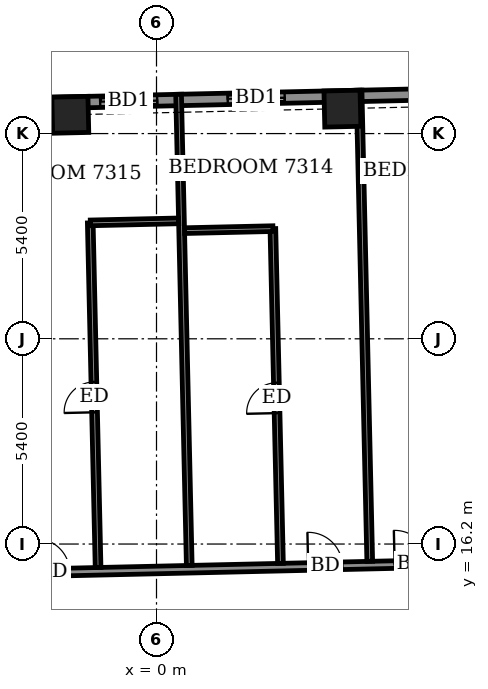
"""IFC4 building model, lengths in metres.
Left out: names, types, materials, properties, quantities, classifications, styles, units other than length and angle.
Written with IfcOpenShell. Run it as: python <this file> out.ifc"""

import sys

from ifc_helpers import new_model, si_unit, direction, frame, frame_2d, origin, origin_2d, place, context, subcontext, project, spatial, rectangle, extrude, element, fill, save


model = new_model("IFC4")
c1 = context("Model", 3, precision=1e-05, world=origin(), true_north=direction((0.0, 1.0)))
c2 = subcontext(c1, "Body", "Model", "MODEL_VIEW")
j1 = project(units=[si_unit("LENGTHUNIT", "METRE"), si_unit("PLANEANGLEUNIT", "RADIAN")], contexts=[c1])
p1 = place(None, origin())
s1 = spatial("IfcSite", under=j1, at=p1, CompositionType="ELEMENT")
p2 = place(p1, origin())
s2 = spatial("IfcBuilding", under=s1, at=p2, CompositionType="ELEMENT")
p3 = place(p2, frame((0.0, 0.0, 287.1)))
s3 = spatial("IfcBuildingStorey", under=s2, at=p3, CompositionType="ELEMENT", Elevation=287.1)
for number, where, z_axis, x_axis in (
    (1, (4.892, 27.656, -0.55), (0.0, 0.0, 1.0), (-1.0, -0.023, 0.0)),
    (2, (-2.268, 27.494, -0.55), (0.0, 0.0, 1.0), (-1.0, -0.023, 0.0)),
):
    element("IfcColumn", number, at=place(p3, frame(where, z_axis=z_axis, x_axis=x_axis)), inside=s3, PredefinedType="COLUMN", context=c2, shape_type="SweptSolid", body=[
        extrude(rectangle(XDim=0.95, YDim=0.95, at=origin_2d()), origin(), (0.0, 0.0, 1.0), 3.6),
    ])
p4 = place(p3, frame((26.216, 28.465, 0.0), z_axis=(0.0, 0.0, 1.0), x_axis=(-0.999742843677, -0.022677004157, 0.0)))
e3 = element("IfcWall", 3, at=p4, inside=s3, PredefinedType="SOLIDWALL", context=c2, shape_type="SweptSolid", body=[
    extrude(rectangle(XDim=49.836, YDim=0.3, at=frame_2d((24.918, 0.0))), origin(), (0.0, 0.0, 1.0), 2.5),
])
p5 = place(p4, frame((0.938, 0.0, 0.0)))
e4 = element("IfcOpeningElement", 4, at=p5, cuts=e3, PredefinedType="OPENING", context=c2, shape_type="SweptSolid", body=[
    extrude(rectangle(XDim=1.5, YDim=2.4, at=frame_2d((0.75, 1.2))), frame((0.0, 0.16, 0.0), z_axis=(0.0, -1.0, 0.0), x_axis=(1.0, 0.0, 0.0)), (0.0, 0.0, 1.0), 0.32),
])
p6 = place(p4, frame((4.087, 0.0, 0.0)))
e5 = element("IfcOpeningElement", 5, at=p6, cuts=e3, PredefinedType="OPENING", context=c2, shape_type="SweptSolid", body=[
    extrude(rectangle(XDim=1.5, YDim=2.4, at=frame_2d((0.75, 1.2))), frame((0.0, 0.16, 0.0), z_axis=(0.0, -1.0, 0.0), x_axis=(1.0, 0.0, 0.0)), (0.0, 0.0, 1.0), 0.32),
])
p7 = place(p4, frame((8.711, 0.0, 0.0)))
e6 = element("IfcOpeningElement", 6, at=p7, cuts=e3, PredefinedType="OPENING", context=c2, shape_type="SweptSolid", body=[
    extrude(rectangle(XDim=1.5, YDim=2.4, at=frame_2d((0.75, 1.2))), frame((0.0, 0.16, 0.0), z_axis=(0.0, -1.0, 0.0), x_axis=(1.0, 0.0, 0.0)), (0.0, 0.0, 1.0), 0.32),
])
p8 = place(p4, frame((12.067, 0.0, 0.0)))
e7 = element("IfcOpeningElement", 7, at=p8, cuts=e3, PredefinedType="OPENING", context=c2, shape_type="SweptSolid", body=[
    extrude(rectangle(XDim=1.5, YDim=2.4, at=frame_2d((0.75, 1.2))), frame((0.0, 0.16, 0.0), z_axis=(0.0, -1.0, 0.0), x_axis=(1.0, 0.0, 0.0)), (0.0, 0.0, 1.0), 0.32),
])
p9 = place(p4, frame((17.836, 0.0, 0.0)))
e8 = element("IfcOpeningElement", 8, at=p9, cuts=e3, PredefinedType="OPENING", context=c2, shape_type="SweptSolid", body=[
    extrude(rectangle(XDim=1.5, YDim=2.4, at=frame_2d((0.75, 1.2))), frame((0.0, 0.16, 0.0), z_axis=(0.0, -1.0, 0.0), x_axis=(1.0, 0.0, 0.0)), (0.0, 0.0, 1.0), 0.32),
])
p10 = place(p4, frame((22.849, 0.0, 0.0)))
e9 = element("IfcOpeningElement", 9, at=p10, cuts=e3, PredefinedType="OPENING", context=c2, shape_type="SweptSolid", body=[
    extrude(rectangle(XDim=1.5, YDim=2.4, at=frame_2d((0.75, 1.2))), frame((0.0, 0.16, 0.0), z_axis=(0.0, -1.0, 0.0), x_axis=(1.0, 0.0, 0.0)), (0.0, 0.0, 1.0), 0.32),
])
p11 = place(p4, frame((26.205, 0.0, 0.0)))
e10 = element("IfcOpeningElement", 10, at=p11, cuts=e3, PredefinedType="OPENING", context=c2, shape_type="SweptSolid", body=[
    extrude(rectangle(XDim=1.5, YDim=2.4, at=frame_2d((0.75, 1.2))), frame((0.0, 0.16, 0.0), z_axis=(0.0, -1.0, 0.0), x_axis=(1.0, 0.0, 0.0)), (0.0, 0.0, 1.0), 0.32),
])
p12 = place(p4, frame((32.011, 0.0, 0.0)))
e11 = element("IfcOpeningElement", 11, at=p12, cuts=e3, PredefinedType="OPENING", context=c2, shape_type="SweptSolid", body=[
    extrude(rectangle(XDim=1.5, YDim=2.4, at=frame_2d((0.75, 1.2))), frame((0.0, 0.16, 0.0), z_axis=(0.0, -1.0, 0.0), x_axis=(1.0, 0.0, 0.0)), (0.0, 0.0, 1.0), 0.32),
])
p13 = place(p4, frame((37.011, 0.0, 0.0)))
e12 = element("IfcOpeningElement", 12, at=p13, cuts=e3, PredefinedType="OPENING", context=c2, shape_type="SweptSolid", body=[
    extrude(rectangle(XDim=1.5, YDim=2.4, at=frame_2d((0.75, 1.2))), frame((0.0, 0.16, 0.0), z_axis=(0.0, -1.0, 0.0), x_axis=(1.0, 0.0, 0.0)), (0.0, 0.0, 1.0), 0.32),
])
p14 = place(p4, frame((40.367, 0.0, 0.0)))
e13 = element("IfcOpeningElement", 13, at=p14, cuts=e3, PredefinedType="OPENING", context=c2, shape_type="SweptSolid", body=[
    extrude(rectangle(XDim=1.5, YDim=2.4, at=frame_2d((0.75, 1.2))), frame((0.0, 0.16, 0.0), z_axis=(0.0, -1.0, 0.0), x_axis=(1.0, 0.0, 0.0)), (0.0, 0.0, 1.0), 0.32),
])
p15 = place(p4, frame((45.499, 0.0, 0.9)))
e14 = element("IfcOpeningElement", 14, at=p15, cuts=e3, PredefinedType="OPENING", context=c2, shape_type="SweptSolid", body=[
    extrude(rectangle(XDim=2.4, YDim=1.5, at=frame_2d((1.2, 0.75))), frame((0.0, 0.16, 0.0), z_axis=(0.0, -1.0, 0.0), x_axis=(1.0, 0.0, 0.0)), (0.0, 0.0, 1.0), 0.32),
])
p16 = place(p3, frame((-26.401, 14.918, 0.0), z_axis=(0.0, 0.0, 1.0), x_axis=(0.99974239733, 0.022696673341, 0.0)))
e15 = element("IfcWall", 15, at=p16, inside=s3, PredefinedType="PARTITIONING", context=c2, shape_type="SweptSolid", body=[
    extrude(rectangle(XDim=55.386, YDim=0.2, at=frame_2d((27.693, 0.0))), origin(), (0.0, 0.0, 1.0), 3.05),
])
p17 = place(p16, frame((52.889, 0.0, 0.0)))
e16 = element("IfcOpeningElement", 16, at=p17, cuts=e15, PredefinedType="OPENING", context=c2, shape_type="SweptSolid", body=[
    extrude(rectangle(XDim=1.0, YDim=2.1, at=frame_2d((0.5, 1.05))), frame((0.0, 0.11, 0.0), z_axis=(0.0, -1.0, 0.0), x_axis=(1.0, 0.0, 0.0)), (0.0, 0.0, 1.0), 0.22),
])
p18 = place(p16, frame((48.6, 0.0, 0.0)))
e17 = element("IfcOpeningElement", 17, at=p18, cuts=e15, PredefinedType="OPENING", context=c2, shape_type="SweptSolid", body=[
    extrude(rectangle(XDim=0.9, YDim=2.1, at=frame_2d((0.45, 1.05))), frame((0.0, 0.11, 0.0), z_axis=(0.0, -1.0, 0.0), x_axis=(1.0, 0.0, 0.0)), (0.0, 0.0, 1.0), 0.22),
])
p19 = place(p16, frame((41.8, 0.0, 0.0)))
e18 = element("IfcOpeningElement", 18, at=p19, cuts=e15, PredefinedType="OPENING", context=c2, shape_type="SweptSolid", body=[
    extrude(rectangle(XDim=0.9, YDim=2.1, at=frame_2d((0.45, 1.05))), frame((0.0, 0.11, 0.0), z_axis=(0.0, -1.0, 0.0), x_axis=(1.0, 0.0, 0.0)), (0.0, 0.0, 1.0), 0.22),
])
p20 = place(p16, frame((39.675, 0.0, 0.0)))
e19 = element("IfcOpeningElement", 19, at=p20, cuts=e15, PredefinedType="OPENING", context=c2, shape_type="SweptSolid", body=[
    extrude(rectangle(XDim=0.9, YDim=2.1, at=frame_2d((0.45, 1.05))), frame((0.0, 0.11, 0.0), z_axis=(0.0, -1.0, 0.0), x_axis=(1.0, 0.0, 0.0)), (0.0, 0.0, 1.0), 0.22),
])
p21 = place(p16, frame((32.675, 0.0, 0.0)))
e20 = element("IfcOpeningElement", 20, at=p21, cuts=e15, PredefinedType="OPENING", context=c2, shape_type="SweptSolid", body=[
    extrude(rectangle(XDim=0.9, YDim=2.1, at=frame_2d((0.45, 1.05))), frame((0.0, 0.11, 0.0), z_axis=(0.0, -1.0, 0.0), x_axis=(1.0, 0.0, 0.0)), (0.0, 0.0, 1.0), 0.22),
])
p22 = place(p16, frame((30.4, 0.0, 0.0)))
e21 = element("IfcOpeningElement", 21, at=p22, cuts=e15, PredefinedType="OPENING", context=c2, shape_type="SweptSolid", body=[
    extrude(rectangle(XDim=0.9, YDim=2.1, at=frame_2d((0.45, 1.05))), frame((0.0, 0.11, 0.0), z_axis=(0.0, -1.0, 0.0), x_axis=(1.0, 0.0, 0.0)), (0.0, 0.0, 1.0), 0.22),
])
p23 = place(p16, frame((23.225, 0.0, 0.0)))
e22 = element("IfcOpeningElement", 22, at=p23, cuts=e15, PredefinedType="OPENING", context=c2, shape_type="SweptSolid", body=[
    extrude(rectangle(XDim=0.9, YDim=2.1, at=frame_2d((0.45, 1.05))), frame((0.0, 0.11, 0.0), z_axis=(0.0, -1.0, 0.0), x_axis=(1.0, 0.0, 0.0)), (0.0, 0.0, 1.0), 0.22),
])
p24 = place(p16, frame((20.9, 0.0, 0.0)))
e23 = element("IfcOpeningElement", 23, at=p24, cuts=e15, PredefinedType="OPENING", context=c2, shape_type="SweptSolid", body=[
    extrude(rectangle(XDim=0.9, YDim=2.1, at=frame_2d((0.45, 1.05))), frame((0.0, 0.11, 0.0), z_axis=(0.0, -1.0, 0.0), x_axis=(1.0, 0.0, 0.0)), (0.0, 0.0, 1.0), 0.22),
])
p25 = place(p16, frame((13.9, 0.0, 0.0)))
e24 = element("IfcOpeningElement", 24, at=p25, cuts=e15, PredefinedType="OPENING", context=c2, shape_type="SweptSolid", body=[
    extrude(rectangle(XDim=0.9, YDim=2.1, at=frame_2d((0.45, 1.05))), frame((0.0, 0.11, 0.0), z_axis=(0.0, -1.0, 0.0), x_axis=(1.0, 0.0, 0.0)), (0.0, 0.0, 1.0), 0.22),
])
p26 = place(p16, frame((11.775, 0.0, 0.0)))
e25 = element("IfcOpeningElement", 25, at=p26, cuts=e15, PredefinedType="OPENING", context=c2, shape_type="SweptSolid", body=[
    extrude(rectangle(XDim=0.9, YDim=2.1, at=frame_2d((0.45, 1.05))), frame((0.0, 0.11, 0.0), z_axis=(0.0, -1.0, 0.0), x_axis=(1.0, 0.0, 0.0)), (0.0, 0.0, 1.0), 0.22),
])
p27 = place(p16, frame((1.65, 0.0, 0.0)))
e26 = element("IfcOpeningElement", 26, at=p27, cuts=e15, PredefinedType="OPENING", context=c2, shape_type="SweptSolid", body=[
    extrude(rectangle(XDim=1.0, YDim=2.1, at=frame_2d((0.5, 1.05))), frame((0.0, 0.11, 0.0), z_axis=(0.0, -1.0, 0.0), x_axis=(1.0, 0.0, 0.0)), (0.0, 0.0, 1.0), 0.22),
])
p28 = place(p16, frame((7.025, 0.0, 0.0)))
e27 = element("IfcOpeningElement", 27, at=p28, cuts=e15, PredefinedType="OPENING", context=c2, shape_type="SweptSolid", body=[
    extrude(rectangle(XDim=0.9, YDim=2.1, at=frame_2d((0.45, 1.05))), frame((0.0, 0.11, 0.0), z_axis=(0.0, -1.0, 0.0), x_axis=(1.0, 0.0, 0.0)), (0.0, 0.0, 1.0), 0.22),
])
p29 = place(p3, frame((-1.537, 15.582, 0.0), z_axis=(0.0, 0.0, 1.0), x_axis=(-0.022690833899, 0.999742529883, 0.0)))
e28 = element("IfcWall", 28, at=p29, inside=s3, PredefinedType="PARTITIONING", context=c2, shape_type="SweptSolid", body=[
    extrude(rectangle(XDim=9.07, YDim=0.15, at=frame_2d((4.535, 0.0))), origin(), (0.0, 0.0, 1.0), 3.05),
])
p30 = place(p29, frame((4.085, 0.0, 0.0)))
e29 = element("IfcOpeningElement", 29, at=p30, cuts=e28, PredefinedType="OPENING", context=c2, shape_type="SweptSolid", body=[
    extrude(rectangle(XDim=0.8, YDim=2.1, at=frame_2d((0.4, 1.05))), frame((0.0, 0.085, 0.0), z_axis=(0.0, -1.0, 0.0), x_axis=(1.0, 0.0, 0.0)), (0.0, 0.0, 1.0), 0.17),
])
p31 = place(p3, frame((0.862, 15.637, 0.0), z_axis=(0.0, 0.0, 1.0), x_axis=(-0.022661475803, 0.999743195783, 0.0)))
e30 = element("IfcWall", 30, at=p31, inside=s3, PredefinedType="PARTITIONING", context=c2, shape_type="SweptSolid", body=[
    extrude(rectangle(XDim=12.4, YDim=0.15, at=frame_2d((6.2, 0.0))), origin(), (0.0, 0.0, 1.0), 2.5),
])
p32 = place(p3, frame((3.262, 15.691, 0.0), z_axis=(0.0, 0.0, 1.0), x_axis=(-0.022694967989, 0.999742436044, 0.0)))
e31 = element("IfcWall", 31, at=p32, inside=s3, PredefinedType="PARTITIONING", context=c2, shape_type="SweptSolid", body=[
    extrude(rectangle(XDim=8.81, YDim=0.15, at=frame_2d((4.405, 0.0))), origin(), (0.0, 0.0, 1.0), 3.05),
])
p33 = place(p32, frame((3.955, 0.0, 0.0)))
e32 = element("IfcOpeningElement", 32, at=p33, cuts=e31, PredefinedType="OPENING", context=c2, shape_type="SweptSolid", body=[
    extrude(rectangle(XDim=0.8, YDim=2.1, at=frame_2d((0.4, 1.05))), frame((0.0, 0.085, 0.0), z_axis=(0.0, -1.0, 0.0), x_axis=(1.0, 0.0, 0.0)), (0.0, 0.0, 1.0), 0.17),
])
p34 = place(p3, frame((5.611, 15.745, 0.0), z_axis=(0.0, 0.0, 1.0), x_axis=(-0.022663260168, 0.999743155335, 0.0)))
e33 = element("IfcWall", 33, at=p34, inside=s3, PredefinedType="PARTITIONING", context=c2, shape_type="SweptSolid", body=[
    extrude(rectangle(XDim=12.399, YDim=0.15, at=frame_2d((6.2, 0.0))), origin(), (0.0, 0.0, 1.0), 2.5),
])
p35 = place(p3, frame((0.74, 24.446, 0.0), z_axis=(0.0, 0.0, 1.0), x_axis=(0.999740260747, 0.02279059109, 0.0)))
e34 = element("IfcWall", 34, at=p35, inside=s3, PredefinedType="PARTITIONING", context=c2, shape_type="SweptSolid", body=[
    extrude(rectangle(XDim=2.324, YDim=0.15, at=frame_2d((1.162, 0.0))), origin(), (0.0, 0.0, 1.0), 3.05),
])
p36 = place(p3, frame((-1.741, 24.65, 0.0), z_axis=(0.0, 0.0, 1.0), x_axis=(0.999740478815, 0.022781023197, 0.0)))
e35 = element("IfcWall", 35, at=p36, inside=s3, PredefinedType="PARTITIONING", context=c2, shape_type="SweptSolid", body=[
    extrude(rectangle(XDim=2.325, YDim=0.15, at=frame_2d((1.163, 0.0))), origin(), (0.0, 0.0, 1.0), 3.05),
])
p37 = place(p10, origin())
e36 = element("IfcDoor", 36, at=p37, inside=s3, OperationType="SLIDING_TO_LEFT", PredefinedType="DOOR", context=c2, shape_type="SweptSolid", body=[
    extrude(rectangle(XDim=1.5, YDim=2.4, at=frame_2d((0.75, 1.2))), frame((0.0, 0.025, 0.0), z_axis=(0.0, -1.0, 0.0), x_axis=(1.0, 0.0, 0.0)), (0.0, 0.0, 1.0), 0.05),
])
fill(e9, e36)
p38 = place(p11, origin())
e37 = element("IfcDoor", 37, at=p38, inside=s3, OperationType="SLIDING_TO_LEFT", PredefinedType="DOOR", context=c2, shape_type="SweptSolid", body=[
    extrude(rectangle(XDim=1.5, YDim=2.4, at=frame_2d((0.75, 1.2))), frame((0.0, 0.025, 0.0), z_axis=(0.0, -1.0, 0.0), x_axis=(1.0, 0.0, 0.0)), (0.0, 0.0, 1.0), 0.05),
])
fill(e10, e37)
p39 = place(p21, origin())
e38 = element("IfcDoor", 38, at=p39, inside=s3, OperationType="SINGLE_SWING_LEFT", PredefinedType="DOOR", context=c2, shape_type="SweptSolid", body=[
    extrude(rectangle(XDim=0.9, YDim=2.1, at=frame_2d((0.45, 1.05))), frame((0.0, 0.025, 0.0), z_axis=(0.0, -1.0, 0.0), x_axis=(1.0, 0.0, 0.0)), (0.0, 0.0, 1.0), 0.05),
])
fill(e20, e38)
p40 = place(p22, origin())
e39 = element("IfcDoor", 39, at=p40, inside=s3, OperationType="SINGLE_SWING_RIGHT", PredefinedType="DOOR", context=c2, shape_type="SweptSolid", body=[
    extrude(rectangle(XDim=0.9, YDim=2.1, at=frame_2d((0.45, 1.05))), frame((0.0, 0.025, 0.0), z_axis=(0.0, -1.0, 0.0), x_axis=(1.0, 0.0, 0.0)), (0.0, 0.0, 1.0), 0.05),
])
fill(e21, e39)
p41 = place(p33, origin())
e40 = element("IfcDoor", 40, at=p41, inside=s3, OperationType="SINGLE_SWING_RIGHT", PredefinedType="DOOR", context=c2, shape_type="SweptSolid", body=[
    extrude(rectangle(XDim=0.8, YDim=2.1, at=frame_2d((0.4, 1.05))), frame((0.0, 0.025, 0.0), z_axis=(0.0, -1.0, 0.0), x_axis=(1.0, 0.0, 0.0)), (0.0, 0.0, 1.0), 0.05),
])
fill(e32, e40)
p42 = place(p23, origin())
e41 = element("IfcDoor", 41, at=p42, inside=s3, OperationType="SINGLE_SWING_LEFT", PredefinedType="DOOR", context=c2, shape_type="SweptSolid", body=[
    extrude(rectangle(XDim=0.9, YDim=2.1, at=frame_2d((0.45, 1.05))), frame((0.0, 0.025, 0.0), z_axis=(0.0, -1.0, 0.0), x_axis=(1.0, 0.0, 0.0)), (0.0, 0.0, 1.0), 0.05),
])
fill(e22, e41)
p43 = place(p30, origin())
e42 = element("IfcDoor", 42, at=p43, inside=s3, OperationType="SINGLE_SWING_LEFT", PredefinedType="DOOR", context=c2, shape_type="SweptSolid", body=[
    extrude(rectangle(XDim=0.8, YDim=2.1, at=frame_2d((0.4, 1.05))), frame((0.0, 0.025, 0.0), z_axis=(0.0, -1.0, 0.0), x_axis=(1.0, 0.0, 0.0)), (0.0, 0.0, 1.0), 0.05),
])
fill(e29, e42)
save(model, sys.argv[1])
